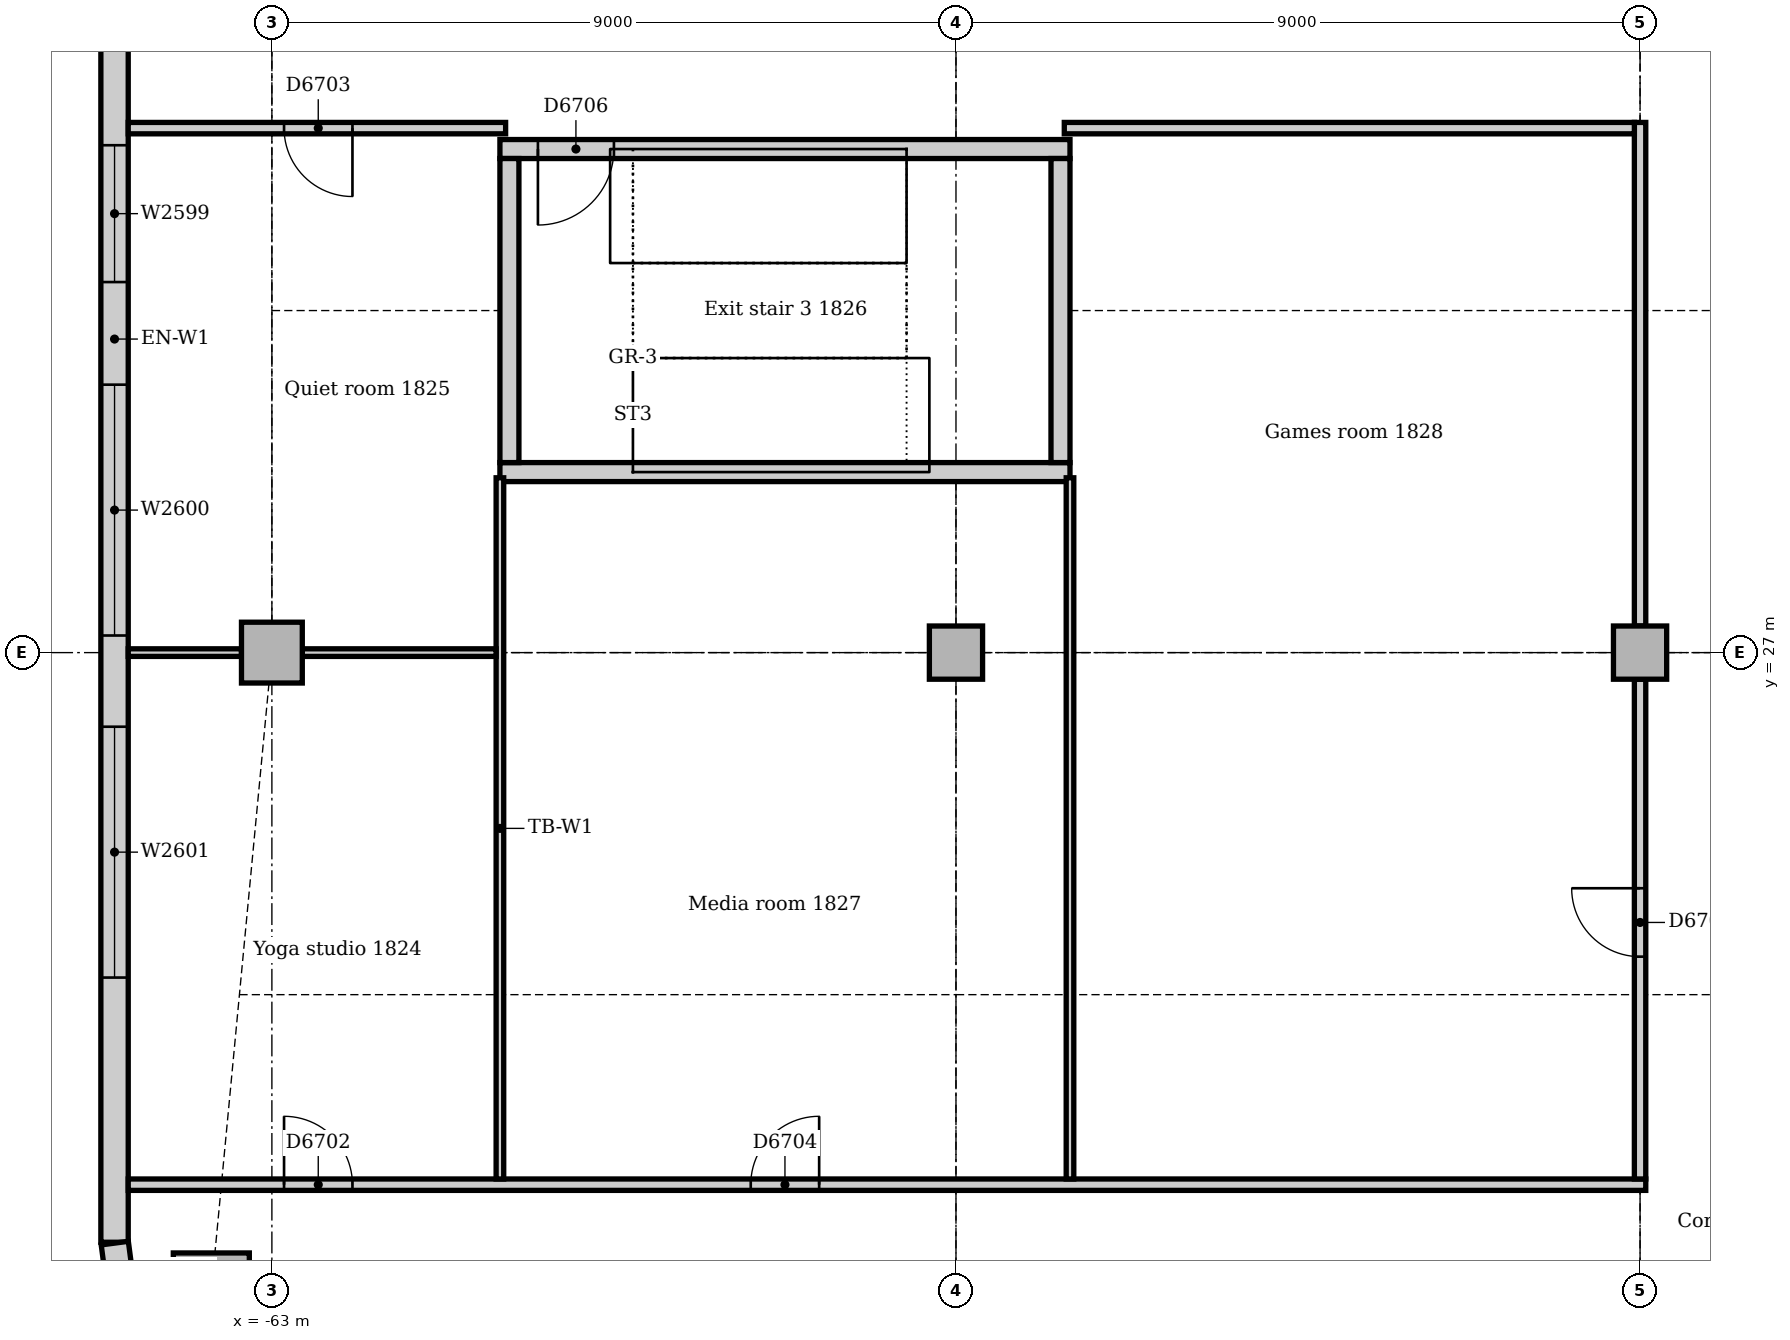
"""IFC4 building model, lengths in metres.
Left out: names, types, materials, properties, quantities, classifications, styles, units other than length and angle.
Written with IfcOpenShell. Run it as: python <this file> out.ifc"""

import sys

from ifc_helpers import new_model, si_unit, direction, frame, frame_2d, origin, origin_2d, place, context, subcontext, project, spatial, rectangle, extrude, element, fill, save


model = new_model("IFC4")
c1 = context("Model", 3, precision=1e-05, world=origin(), true_north=direction((0.0, 1.0)))
c2 = subcontext(c1, "Body", "Model", "MODEL_VIEW")
j1 = project(units=[si_unit("LENGTHUNIT", "METRE"), si_unit("PLANEANGLEUNIT", "RADIAN")], contexts=[c1])
p1 = place(None, origin())
s1 = spatial("IfcSite", under=j1, at=p1, CompositionType="ELEMENT")
p2 = place(p1, origin())
s2 = spatial("IfcBuilding", under=s1, at=p2, CompositionType="ELEMENT")
p3 = place(p2, frame((0.0, 0.0, 79.0)))
s3 = spatial("IfcBuildingStorey", under=s2, at=p3, CompositionType="ELEMENT", Elevation=79.0)
p4 = place(p3, frame((-60.0, 29.375, 0.0), z_axis=(0.0, 0.0, 1.0), x_axis=(1.0, 0.0, 0.0)))
e1 = element("IfcWall", 1, at=p4, inside=s3, PredefinedType="SOLIDWALL", context=c2, shape_type="SweptSolid", body=[
    extrude(rectangle(XDim=7.5, YDim=0.25, at=frame_2d((3.75, 0.0))), origin(), (0.0, 0.0, 1.0), 4.0),
])
p5 = place(p3, frame((-52.5, 33.625, 0.0), z_axis=(0.0, 0.0, 1.0), x_axis=(-1.0, 0.0, 0.0)))
e2 = element("IfcWall", 2, at=p5, inside=s3, PredefinedType="SOLIDWALL", context=c2, shape_type="SweptSolid", body=[
    extrude(rectangle(XDim=7.5, YDim=0.25, at=frame_2d((3.75, 0.0))), origin(), (0.0, 0.0, 1.0), 4.0),
])
p6 = place(p5, frame((6.0, 0.0, 0.0)))
e3 = element("IfcOpeningElement", 3, at=p6, cuts=e2, PredefinedType="OPENING", context=c2, shape_type="SweptSolid", body=[
    extrude(rectangle(XDim=1.0, YDim=2.1, at=frame_2d((0.5, 1.05))), frame((0.0, 0.135, 0.0), z_axis=(0.0, -1.0, 0.0), x_axis=(1.0, 0.0, 0.0)), (0.0, 0.0, 1.0), 0.27),
])
for number, where, z_axis, x_axis in (
    (4, (-52.625, 29.5, 0.0), (0.0, 0.0, 1.0), (0.0, 1.0, 0.0)),
    (5, (-59.875, 33.5, 0.0), (0.0, 0.0, 1.0), (0.0, -1.0, 0.0)),
):
    element("IfcWall", number, at=place(p3, frame(where, z_axis=z_axis, x_axis=x_axis)), inside=s3, PredefinedType="SOLIDWALL", context=c2, shape_type="SweptSolid", body=[
        extrude(rectangle(XDim=4.0, YDim=0.25, at=frame_2d((2.0, 0.0))), origin(), (0.0, 0.0, 1.0), 4.0),
    ])
p7 = place(p3, frame((-63.797, 18.602, 0.0), z_axis=(0.0, 0.0, 1.0), x_axis=(1.0, 0.0, 0.0)))
e6 = element("IfcColumn", 6, at=p7, inside=s3, PredefinedType="COLUMN", context=c2, shape_type="SweptSolid", body=[
    extrude(rectangle(XDim=1.0, YDim=1.0, at=origin_2d()), origin(), (0.0, 0.0, 1.0), 3.85),
])
p8 = place(p3, frame((-63.0, 27.0, 0.0), z_axis=(0.0, 0.0, 1.0), x_axis=(1.0, 0.0, 0.0)))
e7 = element("IfcColumn", 7, at=p8, inside=s3, PredefinedType="COLUMN", context=c2, shape_type="SweptSolid", body=[
    extrude(rectangle(XDim=0.8, YDim=0.8, at=origin_2d()), origin(), (0.0, 0.0, 1.0), 3.85),
])
for number, where, z_axis, x_axis in (
    (8, (-54.0, 27.0, 0.0), (0.0, 0.0, 1.0), (1.0, 0.0, 0.0)),
    (9, (-45.0, 27.0, 0.0), (0.0, 0.0, 1.0), (1.0, 0.0, 0.0)),
):
    element("IfcColumn", number, at=place(p3, frame(where, z_axis=z_axis, x_axis=x_axis)), inside=s3, PredefinedType="COLUMN", context=c2, shape_type="SweptSolid", body=[
        extrude(rectangle(XDim=0.7, YDim=0.7, at=origin_2d()), origin(), (0.0, 0.0, 1.0), 3.85),
    ])
p9 = place(p3, frame((-65.07, 43.007, 0.0), z_axis=(0.0, 0.0, 1.0), x_axis=(0.0, -1.0, 0.0)))
e10 = element("IfcWall", 10, at=p9, inside=s3, PredefinedType="STANDARD", context=c2, shape_type="SweptSolid", body=[
    extrude(rectangle(XDim=23.765, YDim=0.36, at=frame_2d((11.882, 0.0))), origin(), (0.0, 0.0, 1.0), 3.85),
])
p10 = place(p9, frame((4.232, 0.0, 0.9)))
e11 = element("IfcOpeningElement", 11, at=p10, cuts=e10, PredefinedType="OPENING", context=c2, shape_type="SweptSolid", body=[
    extrude(rectangle(XDim=1.8, YDim=1.6, at=frame_2d((0.9, 0.8))), frame((0.0, 0.19, 0.0), z_axis=(0.0, -1.0, 0.0), x_axis=(1.0, 0.0, 0.0)), (0.0, 0.0, 1.0), 0.38),
])
p11 = place(p9, frame((9.332, 0.0, 0.9)))
e12 = element("IfcOpeningElement", 12, at=p11, cuts=e10, PredefinedType="OPENING", context=c2, shape_type="SweptSolid", body=[
    extrude(rectangle(XDim=1.8, YDim=1.6, at=frame_2d((0.9, 0.8))), frame((0.0, 0.19, 0.0), z_axis=(0.0, -1.0, 0.0), x_axis=(1.0, 0.0, 0.0)), (0.0, 0.0, 1.0), 0.38),
])
p12 = place(p9, frame((12.482, 0.0, 0.9)))
e13 = element("IfcOpeningElement", 13, at=p12, cuts=e10, PredefinedType="OPENING", context=c2, shape_type="SweptSolid", body=[
    extrude(rectangle(XDim=3.3, YDim=1.6, at=frame_2d((1.65, 0.8))), frame((0.0, 0.19, 0.0), z_axis=(0.0, -1.0, 0.0), x_axis=(1.0, 0.0, 0.0)), (0.0, 0.0, 1.0), 0.38),
])
p13 = place(p9, frame((16.982, 0.0, 0.9)))
e14 = element("IfcOpeningElement", 14, at=p13, cuts=e10, PredefinedType="OPENING", context=c2, shape_type="SweptSolid", body=[
    extrude(rectangle(XDim=3.3, YDim=1.6, at=frame_2d((1.65, 0.8))), frame((0.0, 0.19, 0.0), z_axis=(0.0, -1.0, 0.0), x_axis=(1.0, 0.0, 0.0)), (0.0, 0.0, 1.0), 0.38),
])
p14 = place(p3, frame((-65.067, 19.231, 0.0), z_axis=(0.0, 0.0, 1.0), x_axis=(0.13055608231, -0.99144092581, 0.0)))
e15 = element("IfcWall", 15, at=p14, inside=s3, PredefinedType="STANDARD", context=c2, shape_type="SweptSolid", body=[
    extrude(rectangle(XDim=0.713, YDim=0.36, at=frame_2d((0.356, 0.0))), origin(), (0.0, 0.0, 1.0), 3.85),
])
p15 = place(p3, frame((-64.89, 20.0, 0.0), z_axis=(0.0, 0.0, 1.0), x_axis=(1.0, 0.0, 0.0)))
e16 = element("IfcWall", 16, at=p15, inside=s3, PredefinedType="PARTITIONING", context=c2, shape_type="SweptSolid", body=[
    extrude(rectangle(XDim=19.965, YDim=0.15, at=frame_2d((9.982, 0.0))), origin(), (0.0, 0.0, 1.0), 3.85),
])
p16 = place(p15, frame((2.05, 0.0, 0.0)))
e17 = element("IfcOpeningElement", 17, at=p16, cuts=e16, PredefinedType="OPENING", context=c2, shape_type="SweptSolid", body=[
    extrude(rectangle(XDim=0.9, YDim=2.1, at=frame_2d((0.45, 1.05))), frame((0.0, 0.085, 0.0), z_axis=(0.0, -1.0, 0.0), x_axis=(1.0, 0.0, 0.0)), (0.0, 0.0, 1.0), 0.17),
])
p17 = place(p15, frame((8.19, 0.0, 0.0)))
e18 = element("IfcOpeningElement", 18, at=p17, cuts=e16, PredefinedType="OPENING", context=c2, shape_type="SweptSolid", body=[
    extrude(rectangle(XDim=0.9, YDim=2.1, at=frame_2d((0.45, 1.05))), frame((0.0, 0.085, 0.0), z_axis=(0.0, -1.0, 0.0), x_axis=(1.0, 0.0, 0.0)), (0.0, 0.0, 1.0), 0.17),
])
p18 = place(p3, frame((-45.0, 20.075, 0.0), z_axis=(0.0, 0.0, 1.0), x_axis=(0.0, 1.0, 0.0)))
e19 = element("IfcWall", 19, at=p18, inside=s3, PredefinedType="PARTITIONING", context=c2, shape_type="SweptSolid", body=[
    extrude(rectangle(XDim=6.575, YDim=0.15, at=frame_2d((3.288, 0.0))), origin(), (0.0, 0.0, 1.0), 3.256),
])
p19 = place(p18, frame((2.925, 0.0, 0.0)))
e20 = element("IfcOpeningElement", 20, at=p19, cuts=e19, PredefinedType="OPENING", context=c2, shape_type="SweptSolid", body=[
    extrude(rectangle(XDim=0.9, YDim=2.1, at=frame_2d((0.45, 1.05))), frame((0.0, 0.085, 0.0), z_axis=(0.0, -1.0, 0.0), x_axis=(1.0, 0.0, 0.0)), (0.0, 0.0, 1.0), 0.17),
])
p20 = place(p3, frame((-45.0, 27.35, 0.0), z_axis=(0.0, 0.0, 1.0), x_axis=(0.0, 1.0, 0.0)))
e21 = element("IfcWall", 21, at=p20, inside=s3, PredefinedType="PARTITIONING", context=c2, shape_type="SweptSolid", body=[
    extrude(rectangle(XDim=6.625, YDim=0.15, at=frame_2d((3.312, 0.0))), origin(), (0.0, 0.0, 1.0), 3.256),
])
p21 = place(p3, frame((-52.575, 33.9, 0.0), z_axis=(0.0, 0.0, 1.0), x_axis=(1.0, 0.0, 0.0)))
e22 = element("IfcWall", 22, at=p21, inside=s3, PredefinedType="PARTITIONING", context=c2, shape_type="SweptSolid", body=[
    extrude(rectangle(XDim=7.5, YDim=0.15, at=frame_2d((3.75, 0.0))), origin(), (0.0, 0.0, 1.0), 3.85),
])
p22 = place(p3, frame((-64.89, 33.9, 0.0), z_axis=(0.0, 0.0, 1.0), x_axis=(1.0, 0.0, 0.0)))
e23 = element("IfcWall", 23, at=p22, inside=s3, PredefinedType="PARTITIONING", context=c2, shape_type="SweptSolid", body=[
    extrude(rectangle(XDim=4.965, YDim=0.15, at=frame_2d((2.482, 0.0))), origin(), (0.0, 0.0, 1.0), 3.85),
])
p23 = place(p22, frame((2.05, 0.0, 0.0)))
e24 = element("IfcOpeningElement", 24, at=p23, cuts=e23, PredefinedType="OPENING", context=c2, shape_type="SweptSolid", body=[
    extrude(rectangle(XDim=0.9, YDim=2.1, at=frame_2d((0.45, 1.05))), frame((0.0, 0.085, 0.0), z_axis=(0.0, -1.0, 0.0), x_axis=(1.0, 0.0, 0.0)), (0.0, 0.0, 1.0), 0.17),
])
for number, where, z_axis, x_axis in (
    (25, (-60.0, 20.075, 0.0), (0.0, 0.0, 1.0), (0.0, 1.0, 0.0)),
    (26, (-52.5, 20.075, 0.0), (0.0, 0.0, 1.0), (0.0, 1.0, 0.0)),
):
    element("IfcWall", number, at=place(p3, frame(where, z_axis=z_axis, x_axis=x_axis)), inside=s3, PredefinedType="PARTITIONING", context=c2, shape_type="SweptSolid", body=[
        extrude(rectangle(XDim=9.225, YDim=0.1, at=frame_2d((4.612, 0.0))), origin(), (0.0, 0.0, 1.0), 3.85),
    ])
p24 = place(p3, frame((-62.6, 27.0, 0.0), z_axis=(0.0, 0.0, 1.0), x_axis=(1.0, 0.0, 0.0)))
e27 = element("IfcWall", 27, at=p24, inside=s3, PredefinedType="PARTITIONING", context=c2, shape_type="SweptSolid", body=[
    extrude(rectangle(XDim=2.55, YDim=0.1, at=frame_2d((1.275, 0.0))), origin(), (0.0, 0.0, 1.0), 3.158),
])
p25 = place(p3, frame((-64.89, 27.0, 0.0), z_axis=(0.0, 0.0, 1.0), x_axis=(1.0, 0.0, 0.0)))
e28 = element("IfcWall", 28, at=p25, inside=s3, PredefinedType="PARTITIONING", context=c2, shape_type="SweptSolid", body=[
    extrude(rectangle(XDim=1.49, YDim=0.1, at=frame_2d((0.745, 0.0))), origin(), (0.0, 0.0, 1.0), 3.85),
])
p26 = place(p11, origin())
e29 = element("IfcWindow", 29, at=p26, inside=s3, PartitioningType="SINGLE_PANEL", PredefinedType="WINDOW", context=c2, shape_type="SweptSolid", body=[
    extrude(rectangle(XDim=1.8, YDim=1.6, at=frame_2d((0.9, 0.8))), frame((0.0, 0.13, 0.0), z_axis=(0.0, -1.0, 0.0), x_axis=(1.0, 0.0, 0.0)), (0.0, 0.0, 1.0), 0.06),
])
fill(e12, e29)
p27 = place(p12, origin())
e30 = element("IfcWindow", 30, at=p27, inside=s3, PartitioningType="SINGLE_PANEL", PredefinedType="WINDOW", context=c2, shape_type="SweptSolid", body=[
    extrude(rectangle(XDim=3.3, YDim=1.6, at=frame_2d((1.65, 0.8))), frame((0.0, 0.13, 0.0), z_axis=(0.0, -1.0, 0.0), x_axis=(1.0, 0.0, 0.0)), (0.0, 0.0, 1.0), 0.06),
])
fill(e13, e30)
p28 = place(p13, origin())
e31 = element("IfcWindow", 31, at=p28, inside=s3, PartitioningType="SINGLE_PANEL", PredefinedType="WINDOW", context=c2, shape_type="SweptSolid", body=[
    extrude(rectangle(XDim=3.3, YDim=1.6, at=frame_2d((1.65, 0.8))), frame((0.0, 0.13, 0.0), z_axis=(0.0, -1.0, 0.0), x_axis=(1.0, 0.0, 0.0)), (0.0, 0.0, 1.0), 0.06),
])
fill(e14, e31)
p29 = place(p16, origin())
e32 = element("IfcDoor", 32, at=p29, inside=s3, OperationType="SINGLE_SWING_LEFT", PredefinedType="DOOR", context=c2, shape_type="SweptSolid", body=[
    extrude(rectangle(XDim=0.9, YDim=2.1, at=frame_2d((0.45, 1.05))), frame((0.0, 0.025, 0.0), z_axis=(0.0, -1.0, 0.0), x_axis=(1.0, 0.0, 0.0)), (0.0, 0.0, 1.0), 0.05),
])
fill(e17, e32)
p30 = place(p23, frame((0.9, 0.0, 0.0), z_axis=(0.0, 0.0, 1.0), x_axis=(-1.0, 0.0, 0.0)))
e33 = element("IfcDoor", 33, at=p30, inside=s3, OperationType="SINGLE_SWING_LEFT", PredefinedType="DOOR", context=c2, shape_type="SweptSolid", body=[
    extrude(rectangle(XDim=0.9, YDim=2.1, at=frame_2d((0.45, 1.05))), frame((0.0, 0.025, 0.0), z_axis=(0.0, -1.0, 0.0), x_axis=(1.0, 0.0, 0.0)), (0.0, 0.0, 1.0), 0.05),
])
fill(e24, e33)
p31 = place(p17, origin())
e34 = element("IfcDoor", 34, at=p31, inside=s3, OperationType="SINGLE_SWING_RIGHT", PredefinedType="DOOR", context=c2, shape_type="SweptSolid", body=[
    extrude(rectangle(XDim=0.9, YDim=2.1, at=frame_2d((0.45, 1.05))), frame((0.0, 0.025, 0.0), z_axis=(0.0, -1.0, 0.0), x_axis=(1.0, 0.0, 0.0)), (0.0, 0.0, 1.0), 0.05),
])
fill(e18, e34)
p32 = place(p19, origin())
e35 = element("IfcDoor", 35, at=p32, inside=s3, OperationType="SINGLE_SWING_RIGHT", PredefinedType="DOOR", context=c2, shape_type="SweptSolid", body=[
    extrude(rectangle(XDim=0.9, YDim=2.1, at=frame_2d((0.45, 1.05))), frame((0.0, 0.025, 0.0), z_axis=(0.0, -1.0, 0.0), x_axis=(1.0, 0.0, 0.0)), (0.0, 0.0, 1.0), 0.05),
])
fill(e20, e35)
p33 = place(p6, origin())
e36 = element("IfcDoor", 36, at=p33, inside=s3, OperationType="SINGLE_SWING_RIGHT", PredefinedType="DOOR", context=c2, shape_type="SweptSolid", body=[
    extrude(rectangle(XDim=1.0, YDim=2.1, at=frame_2d((0.5, 1.05))), frame((0.0, 0.025, 0.0), z_axis=(0.0, -1.0, 0.0), x_axis=(1.0, 0.0, 0.0)), (0.0, 0.0, 1.0), 0.05),
])
fill(e3, e36)
save(model, sys.argv[1])
